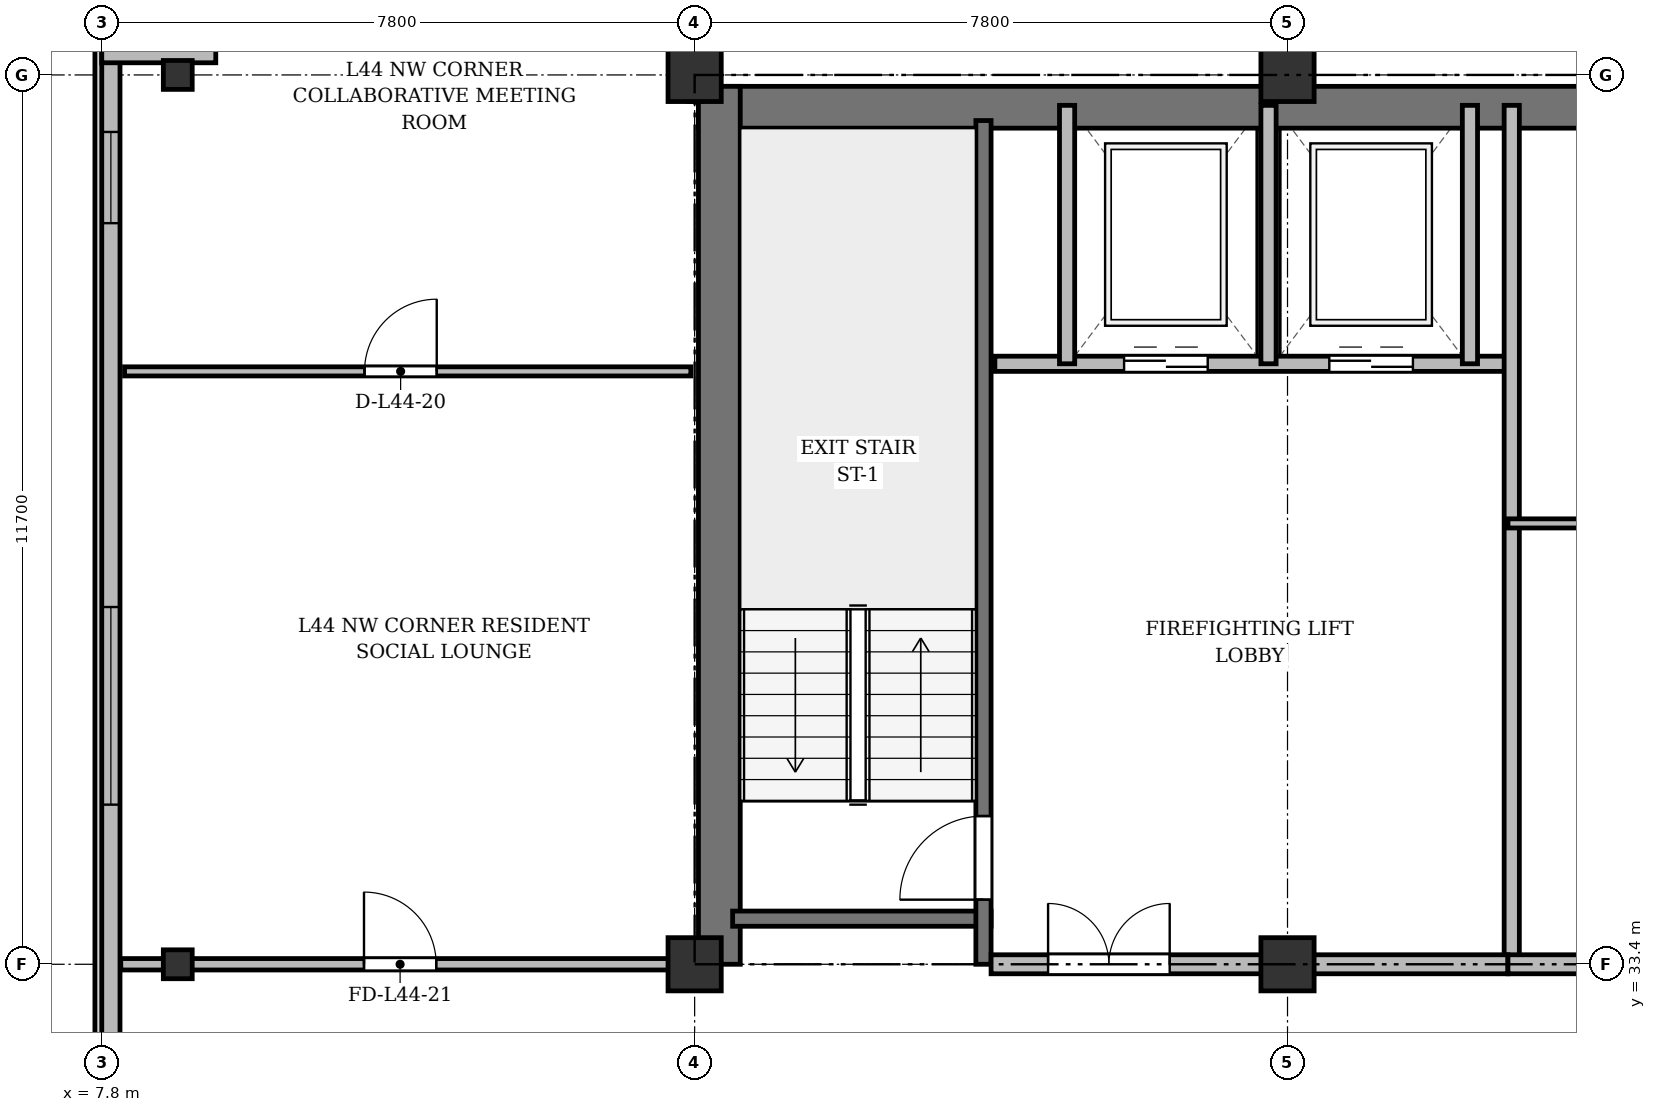
"""IFC4 building model, lengths in metres.
Left out: names, types, materials, properties, quantities, classifications, styles, units other than length and angle.
Written with IfcOpenShell. Run it as: python <this file> out.ifc"""

import sys

from ifc_helpers import new_model, si_unit, direction, frame, frame_2d, origin, origin_2d, place, context, subcontext, project, spatial, rectangle, i_section, extrude, source, transform, mapped, element, fill, save


model = new_model("IFC4")
c1 = context("Model", 3, precision=1e-05, world=origin(), true_north=direction((0.0, 1.0)))
c2 = subcontext(c1, "Body", "Model", "MODEL_VIEW")
j1 = project(units=[si_unit("LENGTHUNIT", "METRE"), si_unit("PLANEANGLEUNIT", "RADIAN")], contexts=[c1])
p1 = place(None, origin())
s1 = spatial("IfcSite", under=j1, at=p1, CompositionType="ELEMENT")
p2 = place(p1, origin())
s2 = spatial("IfcBuilding", under=s1, at=p2, CompositionType="ELEMENT")
p3 = place(p2, frame((0.0, 0.0, 168.1)))
s3 = spatial("IfcBuildingStorey", under=s2, at=p3, CompositionType="ELEMENT", Elevation=168.1)
m1 = source(origin(), c2, "Body", "SweptSolid", [
    extrude(i_section(OverallWidth=0.38, OverallDepth=0.38, WebThickness=0.02, FlangeThickness=0.03, at=origin_2d()), origin(), (0.0, 0.0, 1.0), 3.6),
])
for number, where, z_axis, x_axis in (
    (1, (8.8, 33.4, 0.0), (0.0, 0.0, 1.0), (1.0, 0.0, 0.0)),
    (2, (8.8, 45.1, 0.0), (0.0, 0.0, 1.0), (1.0, 0.0, 0.0)),
):
    element("IfcColumn", number, at=place(p3, frame(where, z_axis=z_axis, x_axis=x_axis)), inside=s3, PredefinedType="COLUMN", context=c2, shape_type="MappedRepresentation", body=[
        mapped(m1, transform((0.0, 0.0, 0.0), x_axis=(1.0, 0.0, 0.0), y_axis=(0.0, 1.0, 0.0), z_axis=(0.0, 0.0, 1.0), scale=1.0)),
    ])
m2 = source(origin(), c2, "Body", "SweptSolid", [
    extrude(rectangle(XDim=0.7, YDim=0.7, at=origin_2d()), origin(), (0.0, 0.0, 1.0), 3.6),
])
for number, where, z_axis, x_axis in (
    (3, (15.6, 33.4, 0.0), (0.0, 0.0, 1.0), (1.0, 0.0, 0.0)),
    (4, (15.6, 45.1, 0.0), (0.0, 0.0, 1.0), (1.0, 0.0, 0.0)),
    (5, (23.4, 33.4, 0.0), (0.0, 0.0, 1.0), (1.0, 0.0, 0.0)),
    (6, (23.4, 45.1, 0.0), (0.0, 0.0, 1.0), (1.0, 0.0, 0.0)),
):
    element("IfcColumn", number, at=place(p3, frame(where, z_axis=z_axis, x_axis=x_axis)), inside=s3, PredefinedType="COLUMN", context=c2, shape_type="MappedRepresentation", body=[
        mapped(m2, transform((0.0, 0.0, 0.0), x_axis=(1.0, 0.0, 0.0), y_axis=(0.0, 1.0, 0.0), z_axis=(0.0, 0.0, 1.0), scale=1.0)),
    ])
p4 = place(p3, frame((7.92, 6.3, 0.0), z_axis=(0.0, 0.0, 1.0), x_axis=(0.0, 1.0, 0.0)))
e7 = element("IfcWall", 7, at=p4, inside=s3, PredefinedType="SOLIDWALL", context=c2, shape_type="SweptSolid", body=[
    extrude(rectangle(XDim=39.2, YDim=0.24, at=frame_2d((19.6, 0.0))), origin(), (0.0, 0.0, 1.0), 3.35),
])
p5 = place(p4, frame((1.45, 0.0, 0.92)))
e8 = element("IfcOpeningElement", 8, at=p5, cuts=e7, PredefinedType="OPENING", context=c2, shape_type="SweptSolid", body=[
    extrude(rectangle(XDim=1.2, YDim=1.65, at=frame_2d((0.6, 0.825))), frame((0.0, 0.13, 0.0), z_axis=(0.0, -1.0, 0.0), x_axis=(1.0, 0.0, 0.0)), (0.0, 0.0, 1.0), 0.26),
])
p6 = place(p4, frame((3.8, 0.0, 0.92)))
e9 = element("IfcOpeningElement", 9, at=p6, cuts=e7, PredefinedType="OPENING", context=c2, shape_type="SweptSolid", body=[
    extrude(rectangle(XDim=2.6, YDim=1.9, at=frame_2d((1.3, 0.95))), frame((0.0, 0.13, 0.0), z_axis=(0.0, -1.0, 0.0), x_axis=(1.0, 0.0, 0.0)), (0.0, 0.0, 1.0), 0.26),
])
p7 = place(p4, frame((8.0, 0.0, 0.92)))
e10 = element("IfcOpeningElement", 10, at=p7, cuts=e7, PredefinedType="OPENING", context=c2, shape_type="SweptSolid", body=[
    extrude(rectangle(XDim=2.6, YDim=1.9, at=frame_2d((1.3, 0.95))), frame((0.0, 0.13, 0.0), z_axis=(0.0, -1.0, 0.0), x_axis=(1.0, 0.0, 0.0)), (0.0, 0.0, 1.0), 0.26),
])
p8 = place(p4, frame((15.2, 0.0, 0.92)))
e11 = element("IfcOpeningElement", 11, at=p8, cuts=e7, PredefinedType="OPENING", context=c2, shape_type="SweptSolid", body=[
    extrude(rectangle(XDim=2.6, YDim=1.9, at=frame_2d((1.3, 0.95))), frame((0.0, 0.13, 0.0), z_axis=(0.0, -1.0, 0.0), x_axis=(1.0, 0.0, 0.0)), (0.0, 0.0, 1.0), 0.26),
])
p9 = place(p4, frame((29.2, 0.0, 0.92)))
e12 = element("IfcOpeningElement", 12, at=p9, cuts=e7, PredefinedType="OPENING", context=c2, shape_type="SweptSolid", body=[
    extrude(rectangle(XDim=2.6, YDim=1.9, at=frame_2d((1.3, 0.95))), frame((0.0, 0.13, 0.0), z_axis=(0.0, -1.0, 0.0), x_axis=(1.0, 0.0, 0.0)), (0.0, 0.0, 1.0), 0.26),
])
p10 = place(p4, frame((36.85, 0.0, 0.92)))
e13 = element("IfcOpeningElement", 13, at=p10, cuts=e7, PredefinedType="OPENING", context=c2, shape_type="SweptSolid", body=[
    extrude(rectangle(XDim=1.2, YDim=1.65, at=frame_2d((0.6, 0.825))), frame((0.0, 0.13, 0.0), z_axis=(0.0, -1.0, 0.0), x_axis=(1.0, 0.0, 0.0)), (0.0, 0.0, 1.0), 0.26),
])
p11 = place(p3, frame((7.8, 45.38, 0.0), z_axis=(0.0, 0.0, 1.0), x_axis=(1.0, 0.0, 0.0)))
e14 = element("IfcWall", 14, at=p11, inside=s3, PredefinedType="SOLIDWALL", context=c2, shape_type="SweptSolid", body=[
    extrude(rectangle(XDim=1.5, YDim=0.24, at=frame_2d((0.75, 0.0))), origin(), (0.0, 0.0, 1.0), 3.35),
])
p12 = place(p3, frame((15.65, 44.675, 0.0), z_axis=(0.0, 0.0, 1.0), x_axis=(1.0, 0.0, 0.0)))
e15 = element("IfcWall", 15, at=p12, inside=s3, PredefinedType="SHEAR", context=c2, shape_type="SweptSolid", body=[
    extrude(rectangle(XDim=43.1, YDim=0.55, at=frame_2d((21.55, 0.0))), origin(), (0.0, 0.0, 1.0), 3.35),
])
p13 = place(p3, frame((15.925, 33.4, 0.0), z_axis=(0.0, 0.0, 1.0), x_axis=(0.0, 1.0, 0.0)))
e16 = element("IfcWall", 16, at=p13, inside=s3, PredefinedType="SHEAR", context=c2, shape_type="SweptSolid", body=[
    extrude(rectangle(XDim=11.55, YDim=0.55, at=frame_2d((5.775, 0.0))), origin(), (0.0, 0.0, 1.0), 3.35),
])
p14 = place(p3, frame((16.1, 34.0, 0.0), z_axis=(0.0, 0.0, 1.0), x_axis=(1.0, 0.0, 0.0)))
e17 = element("IfcWall", 17, at=p14, inside=s3, PredefinedType="SHEAR", context=c2, shape_type="SweptSolid", body=[
    extrude(rectangle(XDim=3.4, YDim=0.2, at=frame_2d((1.7, 0.0))), origin(), (0.0, 0.0, 1.0), 3.35),
])
p15 = place(p3, frame((19.4, 33.4, 0.0), z_axis=(0.0, 0.0, 1.0), x_axis=(0.0, 1.0, 0.0)))
e18 = element("IfcWall", 18, at=p15, inside=s3, PredefinedType="SHEAR", context=c2, shape_type="SweptSolid", body=[
    extrude(rectangle(XDim=11.1, YDim=0.2, at=frame_2d((5.55, 0.0))), origin(), (0.0, 0.0, 1.0), 3.35),
])
p16 = place(p15, frame((0.85, 0.0, 0.0)))
e19 = element("IfcOpeningElement", 19, at=p16, cuts=e18, PredefinedType="OPENING", context=c2, shape_type="SweptSolid", body=[
    extrude(rectangle(XDim=1.1, YDim=2.15, at=frame_2d((0.55, 1.075))), frame((0.0, 0.11, 0.0), z_axis=(0.0, -1.0, 0.0), x_axis=(1.0, 0.0, 0.0)), (0.0, 0.0, 1.0), 0.22),
])
p17 = place(p3, frame((19.55, 41.3, 0.0), z_axis=(0.0, 0.0, 1.0), x_axis=(1.0, 0.0, 0.0)))
e20 = element("IfcWall", 20, at=p17, inside=s3, PredefinedType="SOLIDWALL", context=c2, shape_type="SweptSolid", body=[
    extrude(rectangle(XDim=6.75, YDim=0.2, at=frame_2d((3.375, 0.0))), origin(), (0.0, 0.0, 1.0), 3.35),
])
p18 = place(p17, frame((1.7, 0.0, 0.0)))
e21 = element("IfcOpeningElement", 21, at=p18, cuts=e20, PredefinedType="OPENING", context=c2, shape_type="SweptSolid", body=[
    extrude(rectangle(XDim=1.1, YDim=2.15, at=frame_2d((0.55, 1.075))), frame((0.0, 0.11, 0.0), z_axis=(0.0, -1.0, 0.0), x_axis=(1.0, 0.0, 0.0)), (0.0, 0.0, 1.0), 0.22),
])
p19 = place(p17, frame((4.4, 0.0, 0.0)))
e22 = element("IfcOpeningElement", 22, at=p19, cuts=e20, PredefinedType="OPENING", context=c2, shape_type="SweptSolid", body=[
    extrude(rectangle(XDim=1.1, YDim=2.15, at=frame_2d((0.55, 1.075))), frame((0.0, 0.11, 0.0), z_axis=(0.0, -1.0, 0.0), x_axis=(1.0, 0.0, 0.0)), (0.0, 0.0, 1.0), 0.22),
])
for number, where, z_axis, x_axis in (
    (23, (20.5, 41.3, 0.0), (0.0, 0.0, 1.0), (0.0, 1.0, 0.0)),
    (24, (23.15, 41.3, 0.0), (0.0, 0.0, 1.0), (0.0, 1.0, 0.0)),
    (25, (25.8, 41.3, 0.0), (0.0, 0.0, 1.0), (0.0, 1.0, 0.0)),
):
    element("IfcWall", number, at=place(p3, frame(where, z_axis=z_axis, x_axis=x_axis)), inside=s3, PredefinedType="SOLIDWALL", context=c2, shape_type="SweptSolid", body=[
        extrude(rectangle(XDim=3.4, YDim=0.2, at=frame_2d((1.7, 0.0))), origin(), (0.0, 0.0, 1.0), 3.35),
    ])
p20 = place(p3, frame((26.35, 33.4, 0.0), z_axis=(0.0, 0.0, 1.0), x_axis=(0.0, 1.0, 0.0)))
e26 = element("IfcWall", 26, at=p20, inside=s3, PredefinedType="SOLIDWALL", context=c2, shape_type="SweptSolid", body=[
    extrude(rectangle(XDim=11.3, YDim=0.2, at=frame_2d((5.65, 0.0))), origin(), (0.0, 0.0, 1.0), 2.75),
])
p21 = place(p3, frame((19.5, 33.4, 0.0), z_axis=(0.0, 0.0, 1.0), x_axis=(1.0, 0.0, 0.0)))
e27 = element("IfcWall", 27, at=p21, inside=s3, PredefinedType="PARTITIONING", context=c2, shape_type="SweptSolid", body=[
    extrude(rectangle(XDim=6.8, YDim=0.25, at=frame_2d((3.4, 0.0))), origin(), (0.0, 0.0, 1.0), 2.75),
])
p22 = place(p21, frame((0.75, 0.0, 0.0)))
e28 = element("IfcOpeningElement", 28, at=p22, cuts=e27, PredefinedType="OPENING", context=c2, shape_type="SweptSolid", body=[
    extrude(rectangle(XDim=1.6, YDim=2.2, at=frame_2d((0.8, 1.1))), frame((0.0, 0.135, 0.0), z_axis=(0.0, -1.0, 0.0), x_axis=(1.0, 0.0, 0.0)), (0.0, 0.0, 1.0), 0.27),
])
p23 = place(p3, frame((26.3, 39.2, 0.0), z_axis=(0.0, 0.0, 1.0), x_axis=(1.0, 0.0, 0.0)))
e29 = element("IfcWall", 29, at=p23, inside=s3, PredefinedType="PARTITIONING", context=c2, shape_type="SweptSolid", body=[
    extrude(rectangle(XDim=7.0, YDim=0.12, at=frame_2d((3.5, 0.0))), origin(), (0.0, 0.0, 1.0), 2.85),
])
p24 = place(p23, frame((2.6, 0.0, 0.0)))
e30 = element("IfcOpeningElement", 30, at=p24, cuts=e29, PredefinedType="OPENING", context=c2, shape_type="SweptSolid", body=[
    extrude(rectangle(XDim=0.95, YDim=2.15, at=frame_2d((0.475, 1.075))), frame((0.0, 0.07, 0.0), z_axis=(0.0, -1.0, 0.0), x_axis=(1.0, 0.0, 0.0)), (0.0, 0.0, 1.0), 0.14),
])
p25 = place(p3, frame((26.3, 33.4, 0.0), z_axis=(0.0, 0.0, 1.0), x_axis=(1.0, 0.0, 0.0)))
e31 = element("IfcWall", 31, at=p25, inside=s3, PredefinedType="PARTITIONING", context=c2, shape_type="SweptSolid", body=[
    extrude(rectangle(XDim=7.0, YDim=0.25, at=frame_2d((3.5, 0.0))), origin(), (0.0, 0.0, 1.0), 2.75),
])
p26 = place(p25, frame((1.35, 0.0, 0.0)))
e32 = element("IfcOpeningElement", 32, at=p26, cuts=e31, PredefinedType="OPENING", context=c2, shape_type="SweptSolid", body=[
    extrude(rectangle(XDim=0.95, YDim=2.15, at=frame_2d((0.475, 1.075))), frame((0.0, 0.135, 0.0), z_axis=(0.0, -1.0, 0.0), x_axis=(1.0, 0.0, 0.0)), (0.0, 0.0, 1.0), 0.27),
])
p27 = place(p3, frame((8.1, 41.2, 0.0), z_axis=(0.0, 0.0, 1.0), x_axis=(1.0, 0.0, 0.0)))
e33 = element("IfcWall", 33, at=p27, inside=s3, PredefinedType="PARTITIONING", context=c2, shape_type="SweptSolid", body=[
    extrude(rectangle(XDim=7.45, YDim=0.12, at=frame_2d((3.725, 0.0))), origin(), (0.0, 0.0, 1.0), 2.85),
])
p28 = place(p27, frame((3.157, 0.0, 0.0)))
e34 = element("IfcOpeningElement", 34, at=p28, cuts=e33, PredefinedType="OPENING", context=c2, shape_type="SweptSolid", body=[
    extrude(rectangle(XDim=0.95, YDim=2.15, at=frame_2d((0.475, 1.075))), frame((0.0, 0.07, 0.0), z_axis=(0.0, -1.0, 0.0), x_axis=(1.0, 0.0, 0.0)), (0.0, 0.0, 1.0), 0.14),
])
p29 = place(p3, frame((8.05, 33.4, 0.0), z_axis=(0.0, 0.0, 1.0), x_axis=(1.0, 0.0, 0.0)))
e35 = element("IfcWall", 35, at=p29, inside=s3, PredefinedType="PARTITIONING", context=c2, shape_type="SweptSolid", body=[
    extrude(rectangle(XDim=7.55, YDim=0.15, at=frame_2d((3.775, 0.0))), origin(), (0.0, 0.0, 1.0), 2.75),
])
p30 = place(p29, frame((3.2, 0.0, 0.0)))
e36 = element("IfcOpeningElement", 36, at=p30, cuts=e35, PredefinedType="OPENING", context=c2, shape_type="SweptSolid", body=[
    extrude(rectangle(XDim=0.95, YDim=2.15, at=frame_2d((0.475, 1.075))), frame((0.0, 0.085, 0.0), z_axis=(0.0, -1.0, 0.0), x_axis=(1.0, 0.0, 0.0)), (0.0, 0.0, 1.0), 0.17),
])
p31 = place(p3, frame((15.6, 44.75, 0.0), z_axis=(0.0, 0.0, 1.0), x_axis=(0.0, 1.0, 0.0)))
e37 = element("IfcWall", 37, at=p31, inside=s3, PredefinedType="PARTITIONING", context=c2, shape_type="SweptSolid", body=[
    extrude(rectangle(XDim=3.61, YDim=0.15, at=frame_2d((1.805, 0.0))), origin(), (0.0, 0.0, 1.0), 2.85),
])
p32 = place(p31, frame((1.1, 0.0, 0.0)))
e38 = element("IfcOpeningElement", 38, at=p32, cuts=e37, PredefinedType="OPENING", context=c2, shape_type="SweptSolid", body=[
    extrude(rectangle(XDim=0.95, YDim=2.15, at=frame_2d((0.475, 1.075))), frame((0.0, 0.085, 0.0), z_axis=(0.0, -1.0, 0.0), x_axis=(1.0, 0.0, 0.0)), (0.0, 0.0, 1.0), 0.17),
])
m3 = source(origin(), c2, "Body", "SweptSolid", [
    extrude(rectangle(XDim=2.6, YDim=1.9, at=frame_2d((1.3, 0.95))), frame((0.0, 0.03, 0.0), z_axis=(0.0, -1.0, 0.0), x_axis=(1.0, 0.0, 0.0)), (0.0, 0.0, 1.0), 0.06),
])
p33 = place(p9, origin())
e39 = element("IfcWindow", 39, at=p33, inside=s3, PartitioningType="SINGLE_PANEL", PredefinedType="WINDOW", context=c2, shape_type="MappedRepresentation", body=[
    mapped(m3, transform((0.0, 0.0, 0.0), x_axis=(1.0, 0.0, 0.0), y_axis=(0.0, 1.0, 0.0), z_axis=(0.0, 0.0, 1.0), scale=1.0)),
])
fill(e12, e39)
m4 = source(origin(), c2, "Body", "SweptSolid", [
    extrude(rectangle(XDim=1.2, YDim=1.65, at=frame_2d((0.6, 0.825))), frame((0.0, 0.03, 0.0), z_axis=(0.0, -1.0, 0.0), x_axis=(1.0, 0.0, 0.0)), (0.0, 0.0, 1.0), 0.06),
])
p34 = place(p10, origin())
e40 = element("IfcWindow", 40, at=p34, inside=s3, PartitioningType="SINGLE_PANEL", PredefinedType="WINDOW", context=c2, shape_type="MappedRepresentation", body=[
    mapped(m4, transform((0.0, 0.0, 0.0), x_axis=(1.0, 0.0, 0.0), y_axis=(0.0, 1.0, 0.0), z_axis=(0.0, 0.0, 1.0), scale=1.0)),
])
fill(e13, e40)
m5 = source(origin(), c2, "Body", "SweptSolid", [
    extrude(rectangle(XDim=1.1, YDim=2.15, at=frame_2d((0.55, 1.075))), frame((0.0, 0.025, 0.0), z_axis=(0.0, -1.0, 0.0), x_axis=(1.0, 0.0, 0.0)), (0.0, 0.0, 1.0), 0.05),
])
p35 = place(p16, origin())
e41 = element("IfcDoor", 41, at=p35, inside=s3, OperationType="SINGLE_SWING_LEFT", PredefinedType="DOOR", context=c2, shape_type="MappedRepresentation", body=[
    mapped(m5, transform((0.0, 0.0, 0.0), x_axis=(1.0, 0.0, 0.0), y_axis=(0.0, 1.0, 0.0), z_axis=(0.0, 0.0, 1.0), scale=1.0)),
])
fill(e19, e41)
p36 = place(p18, origin())
e42 = element("IfcDoor", 42, at=p36, inside=s3, OperationType="DOUBLE_DOOR_SLIDING", PredefinedType="DOOR", context=c2, shape_type="MappedRepresentation", body=[
    mapped(m5, transform((0.0, 0.0, 0.0), x_axis=(1.0, 0.0, 0.0), y_axis=(0.0, 1.0, 0.0), z_axis=(0.0, 0.0, 1.0), scale=1.0)),
])
fill(e21, e42)
p37 = place(p19, origin())
e43 = element("IfcDoor", 43, at=p37, inside=s3, OperationType="DOUBLE_DOOR_SLIDING", PredefinedType="DOOR", context=c2, shape_type="MappedRepresentation", body=[
    mapped(m5, transform((0.0, 0.0, 0.0), x_axis=(1.0, 0.0, 0.0), y_axis=(0.0, 1.0, 0.0), z_axis=(0.0, 0.0, 1.0), scale=1.0)),
])
fill(e22, e43)
m6 = source(origin(), c2, "Body", "SweptSolid", [
    extrude(rectangle(XDim=1.6, YDim=2.2, at=frame_2d((0.8, 1.1))), frame((0.0, 0.025, 0.0), z_axis=(0.0, -1.0, 0.0), x_axis=(1.0, 0.0, 0.0)), (0.0, 0.0, 1.0), 0.05),
])
p38 = place(p22, origin())
e44 = element("IfcDoor", 44, at=p38, inside=s3, OperationType="DOUBLE_DOOR_SINGLE_SWING", PredefinedType="DOOR", context=c2, shape_type="MappedRepresentation", body=[
    mapped(m6, transform((0.0, 0.0, 0.0), x_axis=(1.0, 0.0, 0.0), y_axis=(0.0, 1.0, 0.0), z_axis=(0.0, 0.0, 1.0), scale=1.0)),
])
fill(e28, e44)
m7 = source(origin(), c2, "Body", "SweptSolid", [
    extrude(rectangle(XDim=0.95, YDim=2.15, at=frame_2d((0.475, 1.075))), frame((0.0, 0.025, 0.0), z_axis=(0.0, -1.0, 0.0), x_axis=(1.0, 0.0, 0.0)), (0.0, 0.0, 1.0), 0.05),
])
p39 = place(p28, origin())
e45 = element("IfcDoor", 45, at=p39, inside=s3, OperationType="SINGLE_SWING_RIGHT", PredefinedType="DOOR", context=c2, shape_type="MappedRepresentation", body=[
    mapped(m7, transform((0.0, 0.0, 0.0), x_axis=(1.0, 0.0, 0.0), y_axis=(0.0, 1.0, 0.0), z_axis=(0.0, 0.0, 1.0), scale=1.0)),
])
fill(e34, e45)
p40 = place(p30, origin())
e46 = element("IfcDoor", 46, at=p40, inside=s3, OperationType="SINGLE_SWING_LEFT", PredefinedType="DOOR", context=c2, shape_type="MappedRepresentation", body=[
    mapped(m7, transform((0.0, 0.0, 0.0), x_axis=(1.0, 0.0, 0.0), y_axis=(0.0, 1.0, 0.0), z_axis=(0.0, 0.0, 1.0), scale=1.0)),
])
fill(e36, e46)
save(model, sys.argv[1])
